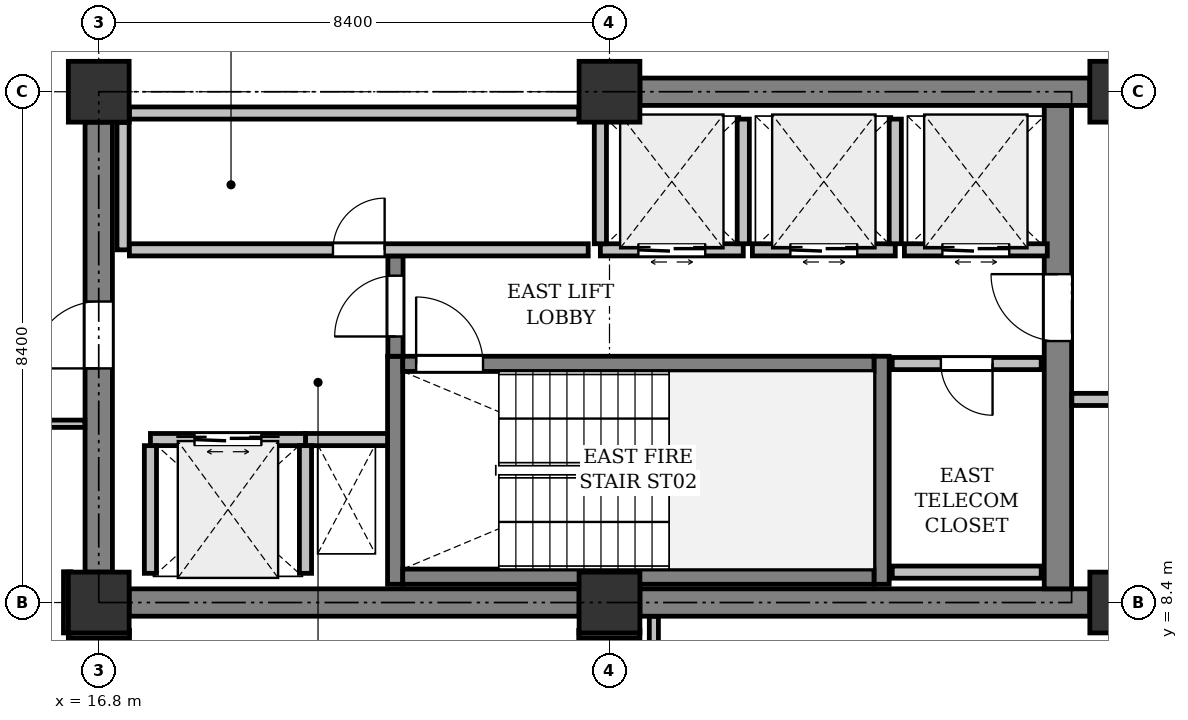
"""IFC4 building model, lengths in metres.
Left out: names, types, materials, properties, quantities, classifications, styles, units other than length and angle.
Written with IfcOpenShell. Run it as: python <this file> out.ifc"""

import sys

from ifc_helpers import new_model, si_unit, direction, frame, frame_2d, origin, origin_2d, place, context, subcontext, project, spatial, rectangle, extrude, element, fill, save


model = new_model("IFC4")
c1 = context("Model", 3, precision=1e-05, world=origin(), true_north=direction((0.0, 1.0)))
c2 = subcontext(c1, "Body", "Model", "MODEL_VIEW")
j1 = project(units=[si_unit("LENGTHUNIT", "METRE"), si_unit("PLANEANGLEUNIT", "RADIAN")], contexts=[c1])
p1 = place(None, origin())
s1 = spatial("IfcSite", under=j1, at=p1, CompositionType="ELEMENT")
p2 = place(p1, origin())
s2 = spatial("IfcBuilding", under=s1, at=p2, CompositionType="ELEMENT")
p3 = place(p2, frame((0.0, 0.0, 237.0)))
s3 = spatial("IfcBuildingStorey", under=s2, at=p3, CompositionType="ELEMENT", Elevation=237.0)
for number, where, z_axis, x_axis in (
    (1, (16.8, 8.4, 0.0), (0.0, 0.0, 1.0), (1.0, 0.0, 0.0)),
    (2, (16.8, 16.8, 0.0), (0.0, 0.0, 1.0), (1.0, 0.0, 0.0)),
    (3, (25.2, 8.4, 0.0), (0.0, 0.0, 1.0), (1.0, 0.0, 0.0)),
    (4, (25.2, 16.8, 0.0), (0.0, 0.0, 1.0), (1.0, 0.0, 0.0)),
    (5, (33.6, 8.4, 0.0), (0.0, 0.0, 1.0), (1.0, 0.0, 0.0)),
    (6, (33.6, 16.8, 0.0), (0.0, 0.0, 1.0), (1.0, 0.0, 0.0)),
):
    element("IfcColumn", number, at=place(p3, frame(where, z_axis=z_axis, x_axis=x_axis)), inside=s3, PredefinedType="COLUMN", context=c2, shape_type="SweptSolid", body=[
        extrude(rectangle(XDim=1.0, YDim=1.0, at=origin_2d()), origin(), (0.0, 0.0, 1.0), 4.1),
    ])
p4 = place(p3, frame((17.3, 8.4, 0.0), z_axis=(0.0, 0.0, 1.0), x_axis=(1.0, 0.0, 0.0)))
e7 = element("IfcWall", 7, at=p4, inside=s3, PredefinedType="SHEAR", context=c2, shape_type="SweptSolid", body=[
    extrude(rectangle(XDim=7.4, YDim=0.45, at=frame_2d((3.7, 0.0))), origin(), (0.0, 0.0, 1.0), 3.825),
])
p5 = place(p3, frame((25.7, 8.4, 0.0), z_axis=(0.0, 0.0, 1.0), x_axis=(1.0, 0.0, 0.0)))
e8 = element("IfcWall", 8, at=p5, inside=s3, PredefinedType="SHEAR", context=c2, shape_type="SweptSolid", body=[
    extrude(rectangle(XDim=7.4, YDim=0.45, at=frame_2d((3.7, 0.0))), origin(), (0.0, 0.0, 1.0), 3.825),
])
p6 = place(p3, frame((32.575, 8.625, 0.0), z_axis=(0.0, 0.0, 1.0), x_axis=(0.0, 1.0, 0.0)))
e9 = element("IfcWall", 9, at=p6, inside=s3, PredefinedType="SHEAR", context=c2, shape_type="SweptSolid", body=[
    extrude(rectangle(XDim=7.95, YDim=0.45, at=frame_2d((3.975, 0.0))), origin(), (0.0, 0.0, 1.0), 3.825),
])
p7 = place(p6, frame((4.075, 0.0, 0.0)))
e10 = element("IfcOpeningElement", 10, at=p7, cuts=e9, PredefinedType="OPENING", context=c2, shape_type="SweptSolid", body=[
    extrude(rectangle(XDim=1.1, YDim=2.15, at=frame_2d((0.55, 1.075))), frame((0.0, 0.235, 0.0), z_axis=(0.0, -1.0, 0.0), x_axis=(1.0, 0.0, 0.0)), (0.0, 0.0, 1.0), 0.47),
])
p8 = place(p3, frame((16.8, 8.9, 0.0), z_axis=(0.0, 0.0, 1.0), x_axis=(0.0, 1.0, 0.0)))
e11 = element("IfcWall", 11, at=p8, inside=s3, PredefinedType="SHEAR", context=c2, shape_type="SweptSolid", body=[
    extrude(rectangle(XDim=7.4, YDim=0.45, at=frame_2d((3.7, 0.0))), origin(), (0.0, 0.0, 1.0), 3.825),
])
p9 = place(p8, frame((3.35, 0.0, 0.0)))
e12 = element("IfcOpeningElement", 12, at=p9, cuts=e11, PredefinedType="OPENING", context=c2, shape_type="SweptSolid", body=[
    extrude(rectangle(XDim=1.1, YDim=2.15, at=frame_2d((0.55, 1.075))), frame((0.0, 0.235, 0.0), z_axis=(0.0, -1.0, 0.0), x_axis=(1.0, 0.0, 0.0)), (0.0, 0.0, 1.0), 0.47),
])
p10 = place(p3, frame((25.7, 16.8, 0.0), z_axis=(0.0, 0.0, 1.0), x_axis=(1.0, 0.0, 0.0)))
e13 = element("IfcWall", 13, at=p10, inside=s3, PredefinedType="SHEAR", context=c2, shape_type="SweptSolid", body=[
    extrude(rectangle(XDim=7.4, YDim=0.45, at=frame_2d((3.7, 0.0))), origin(), (0.0, 0.0, 1.0), 3.825),
])
for number, where, z_axis, x_axis in (
    (14, (21.675, 8.7, 0.0), (0.0, 0.0, 1.0), (0.0, 1.0, 0.0)),
    (15, (29.675, 8.7, 0.0), (0.0, 0.0, 1.0), (0.0, 1.0, 0.0)),
):
    element("IfcWall", number, at=place(p3, frame(where, z_axis=z_axis, x_axis=x_axis)), inside=s3, PredefinedType="SHEAR", context=c2, shape_type="SweptSolid", body=[
        extrude(rectangle(XDim=3.75, YDim=0.25, at=frame_2d((1.875, 0.0))), origin(), (0.0, 0.0, 1.0), 3.825),
    ])
p11 = place(p3, frame((21.8, 8.825, 0.0), z_axis=(0.0, 0.0, 1.0), x_axis=(1.0, 0.0, 0.0)))
e16 = element("IfcWall", 16, at=p11, inside=s3, PredefinedType="SHEAR", context=c2, shape_type="SweptSolid", body=[
    extrude(rectangle(XDim=7.75, YDim=0.25, at=frame_2d((3.875, 0.0))), origin(), (0.0, 0.0, 1.0), 3.825),
])
p12 = place(p3, frame((21.8, 12.325, 0.0), z_axis=(0.0, 0.0, 1.0), x_axis=(1.0, 0.0, 0.0)))
e17 = element("IfcWall", 17, at=p12, inside=s3, PredefinedType="SHEAR", context=c2, shape_type="SweptSolid", body=[
    extrude(rectangle(XDim=7.75, YDim=0.25, at=frame_2d((3.875, 0.0))), origin(), (0.0, 0.0, 1.0), 3.825),
])
p13 = place(p12, frame((0.22, 0.0, 0.0)))
e18 = element("IfcOpeningElement", 18, at=p13, cuts=e17, PredefinedType="OPENING", context=c2, shape_type="SweptSolid", body=[
    extrude(rectangle(XDim=1.1, YDim=2.15, at=frame_2d((0.55, 1.075))), frame((0.0, 0.135, 0.0), z_axis=(0.0, -1.0, 0.0), x_axis=(1.0, 0.0, 0.0)), (0.0, 0.0, 1.0), 0.27),
])
p14 = place(p3, frame((20.2, 11.08, 0.0), z_axis=(0.0, 0.0, 1.0), x_axis=(1.0, 0.0, 0.0)))
e19 = element("IfcWall", 19, at=p14, inside=s3, PredefinedType="PARTITIONING", context=c2, shape_type="SweptSolid", body=[
    extrude(rectangle(XDim=1.35, YDim=0.2, at=frame_2d((0.675, 0.0))), origin(), (0.0, 0.0, 1.0), 3.825),
])
p15 = place(p3, frame((21.68, 12.45, 0.0), z_axis=(0.0, 0.0, 1.0), x_axis=(0.0, 1.0, 0.0)))
e20 = element("IfcWall", 20, at=p15, inside=s3, PredefinedType="SHEAR", context=c2, shape_type="SweptSolid", body=[
    extrude(rectangle(XDim=1.65, YDim=0.25, at=frame_2d((0.825, 0.0))), origin(), (0.0, 0.0, 1.0), 3.825),
])
p16 = place(p15, frame((0.325, 0.0, 0.0)))
e21 = element("IfcOpeningElement", 21, at=p16, cuts=e20, PredefinedType="OPENING", context=c2, shape_type="SweptSolid", body=[
    extrude(rectangle(XDim=1.0, YDim=2.15, at=frame_2d((0.5, 1.075))), frame((0.0, 0.135, 0.0), z_axis=(0.0, -1.0, 0.0), x_axis=(1.0, 0.0, 0.0)), (0.0, 0.0, 1.0), 0.27),
])
p17 = place(p3, frame((17.65, 11.08, 0.0), z_axis=(0.0, 0.0, 1.0), x_axis=(1.0, 0.0, 0.0)))
e22 = element("IfcWall", 22, at=p17, inside=s3, PredefinedType="PARTITIONING", context=c2, shape_type="SweptSolid", body=[
    extrude(rectangle(XDim=2.55, YDim=0.2, at=frame_2d((1.275, 0.0))), origin(), (0.0, 0.0, 1.0), 3.825),
])
p18 = place(p17, frame((0.725, 0.0, 0.0)))
e23 = element("IfcOpeningElement", 23, at=p18, cuts=e22, PredefinedType="OPENING", context=c2, shape_type="SweptSolid", body=[
    extrude(rectangle(XDim=1.1, YDim=2.2, at=frame_2d((0.55, 1.1))), frame((0.0, 0.11, 0.0), z_axis=(0.0, -1.0, 0.0), x_axis=(1.0, 0.0, 0.0)), (0.0, 0.0, 1.0), 0.22),
])
for number, where, z_axis, x_axis in (
    (24, (20.2, 8.88, 0.0), (0.0, 0.0, 1.0), (0.0, 1.0, 0.0)),
    (25, (17.65, 8.88, 0.0), (0.0, 0.0, 1.0), (0.0, 1.0, 0.0)),
):
    element("IfcWall", number, at=place(p3, frame(where, z_axis=z_axis, x_axis=x_axis)), inside=s3, PredefinedType="PARTITIONING", context=c2, shape_type="SweptSolid", body=[
        extrude(rectangle(XDim=2.1, YDim=0.2, at=frame_2d((1.05, 0.0))), origin(), (0.0, 0.0, 1.0), 3.825),
    ])
p19 = place(p3, frame((25.05, 14.2, 0.0), z_axis=(0.0, 0.0, 1.0), x_axis=(1.0, 0.0, 0.0)))
e26 = element("IfcWall", 26, at=p19, inside=s3, PredefinedType="PARTITIONING", context=c2, shape_type="SweptSolid", body=[
    extrude(rectangle(XDim=2.35, YDim=0.2, at=frame_2d((1.175, 0.0))), origin(), (0.0, 0.0, 1.0), 3.825),
])
p20 = place(p19, frame((0.625, 0.0, 0.0)))
e27 = element("IfcOpeningElement", 27, at=p20, cuts=e26, PredefinedType="OPENING", context=c2, shape_type="SweptSolid", body=[
    extrude(rectangle(XDim=1.1, YDim=2.2, at=frame_2d((0.55, 1.1))), frame((0.0, 0.11, 0.0), z_axis=(0.0, -1.0, 0.0), x_axis=(1.0, 0.0, 0.0)), (0.0, 0.0, 1.0), 0.22),
])
for number, where, z_axis, x_axis in (
    (28, (27.4, 14.3, 0.0), (0.0, 0.0, 1.0), (0.0, 1.0, 0.0)),
    (29, (25.05, 14.3, 0.0), (0.0, 0.0, 1.0), (0.0, 1.0, 0.0)),
):
    element("IfcWall", number, at=place(p3, frame(where, z_axis=z_axis, x_axis=x_axis)), inside=s3, PredefinedType="PARTITIONING", context=c2, shape_type="SweptSolid", body=[
        extrude(rectangle(XDim=2.05, YDim=0.2, at=frame_2d((1.025, 0.0))), origin(), (0.0, 0.0, 1.0), 3.825),
    ])
p21 = place(p3, frame((27.55, 14.2, 0.0), z_axis=(0.0, 0.0, 1.0), x_axis=(1.0, 0.0, 0.0)))
e30 = element("IfcWall", 30, at=p21, inside=s3, PredefinedType="PARTITIONING", context=c2, shape_type="SweptSolid", body=[
    extrude(rectangle(XDim=2.35, YDim=0.2, at=frame_2d((1.175, 0.0))), origin(), (0.0, 0.0, 1.0), 3.825),
])
p22 = place(p21, frame((0.625, 0.0, 0.0)))
e31 = element("IfcOpeningElement", 31, at=p22, cuts=e30, PredefinedType="OPENING", context=c2, shape_type="SweptSolid", body=[
    extrude(rectangle(XDim=1.1, YDim=2.2, at=frame_2d((0.55, 1.1))), frame((0.0, 0.11, 0.0), z_axis=(0.0, -1.0, 0.0), x_axis=(1.0, 0.0, 0.0)), (0.0, 0.0, 1.0), 0.22),
])
p23 = place(p3, frame((29.9, 14.3, 0.0), z_axis=(0.0, 0.0, 1.0), x_axis=(0.0, 1.0, 0.0)))
e32 = element("IfcWall", 32, at=p23, inside=s3, PredefinedType="PARTITIONING", context=c2, shape_type="SweptSolid", body=[
    extrude(rectangle(XDim=2.05, YDim=0.2, at=frame_2d((1.025, 0.0))), origin(), (0.0, 0.0, 1.0), 3.825),
])
p24 = place(p3, frame((30.05, 14.2, 0.0), z_axis=(0.0, 0.0, 1.0), x_axis=(1.0, 0.0, 0.0)))
e33 = element("IfcWall", 33, at=p24, inside=s3, PredefinedType="PARTITIONING", context=c2, shape_type="SweptSolid", body=[
    extrude(rectangle(XDim=2.35, YDim=0.2, at=frame_2d((1.175, 0.0))), origin(), (0.0, 0.0, 1.0), 3.825),
])
p25 = place(p24, frame((0.625, 0.0, 0.0)))
e34 = element("IfcOpeningElement", 34, at=p25, cuts=e33, PredefinedType="OPENING", context=c2, shape_type="SweptSolid", body=[
    extrude(rectangle(XDim=1.1, YDim=2.2, at=frame_2d((0.55, 1.1))), frame((0.0, 0.11, 0.0), z_axis=(0.0, -1.0, 0.0), x_axis=(1.0, 0.0, 0.0)), (0.0, 0.0, 1.0), 0.22),
])
p26 = place(p3, frame((24.695, 16.45, 0.0), z_axis=(0.0, 0.0, 1.0), x_axis=(-1.0, 0.0, 0.0)))
e35 = element("IfcWall", 35, at=p26, inside=s3, PredefinedType="PARTITIONING", context=c2, shape_type="SweptSolid", body=[
    extrude(rectangle(XDim=7.39, YDim=0.2, at=frame_2d((3.695, 0.0))), origin(), (0.0, 0.0, 1.0), 3.825),
])
p27 = place(p3, frame((17.2, 16.295, 0.0), z_axis=(0.0, 0.0, 1.0), x_axis=(0.0, -1.0, 0.0)))
e36 = element("IfcWall", 36, at=p27, inside=s3, PredefinedType="PARTITIONING", context=c2, shape_type="SweptSolid", body=[
    extrude(rectangle(XDim=2.095, YDim=0.2, at=frame_2d((1.047, 0.0))), origin(), (0.0, 0.0, 1.0), 3.825),
])
p28 = place(p3, frame((17.304, 14.2, 0.0), z_axis=(0.0, 0.0, 1.0), x_axis=(1.0, 0.0, 0.0)))
e37 = element("IfcWall", 37, at=p28, inside=s3, PredefinedType="PARTITIONING", context=c2, shape_type="SweptSolid", body=[
    extrude(rectangle(XDim=7.546, YDim=0.2, at=frame_2d((3.773, 0.0))), origin(), (0.0, 0.0, 1.0), 3.825),
])
p29 = place(p28, frame((3.348, 0.0, 0.0)))
e38 = element("IfcOpeningElement", 38, at=p29, cuts=e37, PredefinedType="OPENING", context=c2, shape_type="SweptSolid", body=[
    extrude(rectangle(XDim=0.85, YDim=2.15, at=frame_2d((0.425, 1.075))), frame((0.0, 0.11, 0.0), z_axis=(0.0, -1.0, 0.0), x_axis=(1.0, 0.0, 0.0)), (0.0, 0.0, 1.0), 0.22),
])
p30 = place(p3, frame((32.3, 12.33, 0.0), z_axis=(0.0, 0.0, 1.0), x_axis=(-1.0, 0.0, 0.0)))
e39 = element("IfcWall", 39, at=p30, inside=s3, PredefinedType="PARTITIONING", context=c2, shape_type="SweptSolid", body=[
    extrude(rectangle(XDim=2.45, YDim=0.2, at=frame_2d((1.225, 0.0))), origin(), (0.0, 0.0, 1.0), 3.825),
])
p31 = place(p30, frame((0.8, 0.0, 0.0)))
e40 = element("IfcOpeningElement", 40, at=p31, cuts=e39, PredefinedType="OPENING", context=c2, shape_type="SweptSolid", body=[
    extrude(rectangle(XDim=0.85, YDim=2.15, at=frame_2d((0.425, 1.075))), frame((0.0, 0.11, 0.0), z_axis=(0.0, -1.0, 0.0), x_axis=(1.0, 0.0, 0.0)), (0.0, 0.0, 1.0), 0.22),
])
p32 = place(p3, frame((29.85, 8.9, 0.0), z_axis=(0.0, 0.0, 1.0), x_axis=(1.0, 0.0, 0.0)))
e41 = element("IfcWall", 41, at=p32, inside=s3, PredefinedType="PARTITIONING", context=c2, shape_type="SweptSolid", body=[
    extrude(rectangle(XDim=2.45, YDim=0.2, at=frame_2d((1.225, 0.0))), origin(), (0.0, 0.0, 1.0), 3.825),
])
p33 = place(p3, frame((25.93, 0.124, 0.0), z_axis=(0.0, 0.0, 1.0), x_axis=(0.0, 1.0, 0.0)))
e42 = element("IfcWall", 42, at=p33, inside=s3, PredefinedType="PARTITIONING", context=c2, shape_type="SweptSolid", body=[
    extrude(rectangle(XDim=8.047, YDim=0.15, at=frame_2d((4.023, 0.0))), origin(), (0.0, 0.0, 1.0), 3.825),
])
for number, where, z_axis, x_axis in (
    (43, (25.7, 7.88, 0.0), (0.0, 0.0, 1.0), (-1.0, 0.001, 0.0)),
    (44, (17.306, 7.881, 0.0), (0.0, 0.0, 1.0), (-1.0, -0.001, 0.0)),
):
    element("IfcWall", number, at=place(p3, frame(where, z_axis=z_axis, x_axis=x_axis)), inside=s3, PredefinedType="PARTITIONING", context=c2, shape_type="SweptSolid", body=[
        extrude(rectangle(XDim=1.006, YDim=0.12, at=frame_2d((0.503, 0.0))), origin(), (0.0, 0.0, 1.0), 3.371),
    ])
p34 = place(p3, frame((16.28, 7.9, 0.0), z_axis=(0.0, 0.0, 1.0), x_axis=(0.000970873329, 0.999999528702, 0.0)))
e45 = element("IfcWall", 45, at=p34, inside=s3, PredefinedType="PARTITIONING", context=c2, shape_type="SweptSolid", body=[
    extrude(rectangle(XDim=1.006, YDim=0.12, at=frame_2d((0.503, 0.0))), origin(), (0.0, 0.0, 1.0), 3.365),
])
p35 = place(p3, frame((16.571, 11.34, 0.0), z_axis=(0.0, 0.0, 1.0), x_axis=(-1.0, 0.0, 0.0)))
e46 = element("IfcWall", 46, at=p35, inside=s3, PredefinedType="PARTITIONING", context=c2, shape_type="SweptSolid", body=[
    extrude(rectangle(XDim=2.171, YDim=0.12, at=frame_2d((1.085, 0.0))), origin(), (0.0, 0.0, 1.0), 3.825),
])
p36 = place(p3, frame((34.236, 11.74, 0.0), z_axis=(0.0, 0.0, 1.0), x_axis=(-1.0, 0.0, 0.0)))
e47 = element("IfcWall", 47, at=p36, inside=s3, PredefinedType="PARTITIONING", context=c2, shape_type="SweptSolid", body=[
    extrude(rectangle(XDim=1.432, YDim=0.2, at=frame_2d((0.716, 0.0))), origin(), (0.0, 0.0, 1.0), 3.371),
])
p37 = place(p7, origin())
e48 = element("IfcDoor", 48, at=p37, inside=s3, OperationType="SINGLE_SWING_RIGHT", PredefinedType="DOOR", context=c2, shape_type="SweptSolid", body=[
    extrude(rectangle(XDim=1.1, YDim=2.15, at=frame_2d((0.55, 1.075))), frame((0.0, 0.025, 0.0), z_axis=(0.0, -1.0, 0.0), x_axis=(1.0, 0.0, 0.0)), (0.0, 0.0, 1.0), 0.05),
])
fill(e10, e48)
p38 = place(p9, origin())
e49 = element("IfcDoor", 49, at=p38, inside=s3, OperationType="SINGLE_SWING_LEFT", PredefinedType="DOOR", context=c2, shape_type="SweptSolid", body=[
    extrude(rectangle(XDim=1.1, YDim=2.15, at=frame_2d((0.55, 1.075))), frame((0.0, 0.025, 0.0), z_axis=(0.0, -1.0, 0.0), x_axis=(1.0, 0.0, 0.0)), (0.0, 0.0, 1.0), 0.05),
])
fill(e12, e49)
p39 = place(p13, origin())
e50 = element("IfcDoor", 50, at=p39, inside=s3, OperationType="SINGLE_SWING_LEFT", PredefinedType="DOOR", context=c2, shape_type="SweptSolid", body=[
    extrude(rectangle(XDim=1.1, YDim=2.15, at=frame_2d((0.55, 1.075))), frame((0.0, 0.025, 0.0), z_axis=(0.0, -1.0, 0.0), x_axis=(1.0, 0.0, 0.0)), (0.0, 0.0, 1.0), 0.05),
])
fill(e18, e50)
p40 = place(p16, origin())
e51 = element("IfcDoor", 51, at=p40, inside=s3, OperationType="SINGLE_SWING_LEFT", PredefinedType="DOOR", context=c2, shape_type="SweptSolid", body=[
    extrude(rectangle(XDim=1.0, YDim=2.15, at=frame_2d((0.5, 1.075))), frame((0.0, 0.025, 0.0), z_axis=(0.0, -1.0, 0.0), x_axis=(1.0, 0.0, 0.0)), (0.0, 0.0, 1.0), 0.05),
])
fill(e21, e51)
p41 = place(p18, origin())
e52 = element("IfcDoor", 52, at=p41, inside=s3, OperationType="DOUBLE_DOOR_SLIDING", PredefinedType="DOOR", context=c2, shape_type="SweptSolid", body=[
    extrude(rectangle(XDim=1.1, YDim=2.2, at=frame_2d((0.55, 1.1))), frame((0.0, 0.025, 0.0), z_axis=(0.0, -1.0, 0.0), x_axis=(1.0, 0.0, 0.0)), (0.0, 0.0, 1.0), 0.05),
])
fill(e23, e52)
p42 = place(p20, origin())
e53 = element("IfcDoor", 53, at=p42, inside=s3, OperationType="DOUBLE_DOOR_SLIDING", PredefinedType="DOOR", context=c2, shape_type="SweptSolid", body=[
    extrude(rectangle(XDim=1.1, YDim=2.2, at=frame_2d((0.55, 1.1))), frame((0.0, 0.025, 0.0), z_axis=(0.0, -1.0, 0.0), x_axis=(1.0, 0.0, 0.0)), (0.0, 0.0, 1.0), 0.05),
])
fill(e27, e53)
p43 = place(p22, origin())
e54 = element("IfcDoor", 54, at=p43, inside=s3, OperationType="DOUBLE_DOOR_SLIDING", PredefinedType="DOOR", context=c2, shape_type="SweptSolid", body=[
    extrude(rectangle(XDim=1.1, YDim=2.2, at=frame_2d((0.55, 1.1))), frame((0.0, 0.025, 0.0), z_axis=(0.0, -1.0, 0.0), x_axis=(1.0, 0.0, 0.0)), (0.0, 0.0, 1.0), 0.05),
])
fill(e31, e54)
p44 = place(p25, origin())
e55 = element("IfcDoor", 55, at=p44, inside=s3, OperationType="DOUBLE_DOOR_SLIDING", PredefinedType="DOOR", context=c2, shape_type="SweptSolid", body=[
    extrude(rectangle(XDim=1.1, YDim=2.2, at=frame_2d((0.55, 1.1))), frame((0.0, 0.025, 0.0), z_axis=(0.0, -1.0, 0.0), x_axis=(1.0, 0.0, 0.0)), (0.0, 0.0, 1.0), 0.05),
])
fill(e34, e55)
p45 = place(p29, origin())
e56 = element("IfcDoor", 56, at=p45, inside=s3, OperationType="SINGLE_SWING_RIGHT", PredefinedType="DOOR", context=c2, shape_type="SweptSolid", body=[
    extrude(rectangle(XDim=0.85, YDim=2.15, at=frame_2d((0.425, 1.075))), frame((0.0, 0.025, 0.0), z_axis=(0.0, -1.0, 0.0), x_axis=(1.0, 0.0, 0.0)), (0.0, 0.0, 1.0), 0.05),
])
fill(e38, e56)
p46 = place(p31, origin())
e57 = element("IfcDoor", 57, at=p46, inside=s3, OperationType="SINGLE_SWING_LEFT", PredefinedType="DOOR", context=c2, shape_type="SweptSolid", body=[
    extrude(rectangle(XDim=0.85, YDim=2.15, at=frame_2d((0.425, 1.075))), frame((0.0, 0.025, 0.0), z_axis=(0.0, -1.0, 0.0), x_axis=(1.0, 0.0, 0.0)), (0.0, 0.0, 1.0), 0.05),
])
fill(e40, e57)
save(model, sys.argv[1])
